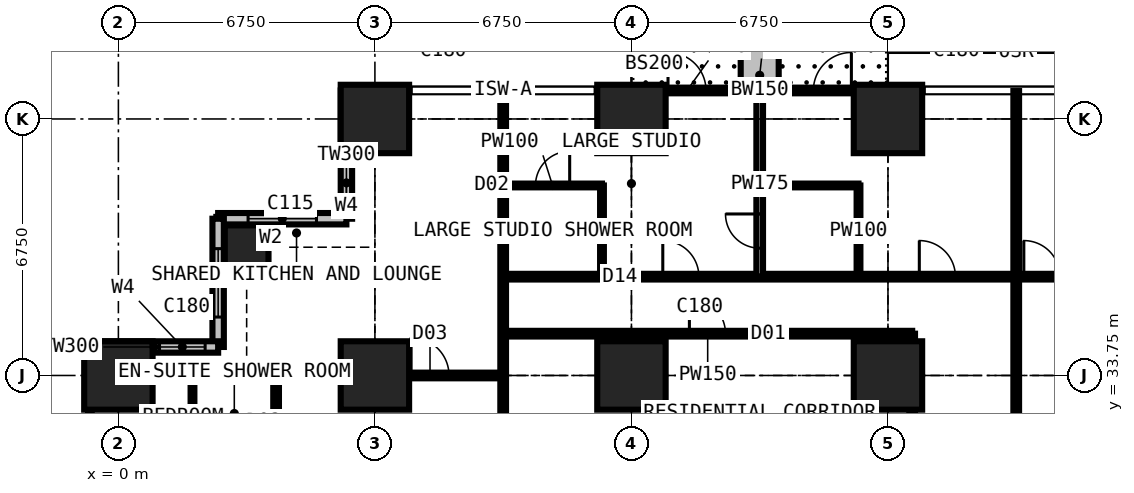
"""IFC4 building model, lengths in metres.
Left out: names, types, materials, properties, quantities, classifications, styles, units other than length and angle.
Written with IfcOpenShell. Run it as: python <this file> out.ifc"""

import sys

from ifc_helpers import new_model, si_unit, direction, frame, frame_2d, origin, origin_2d, place, context, subcontext, project, spatial, rectangle, extrude, element, fill, save


model = new_model("IFC4")
c1 = context("Model", 3, precision=1e-05, world=origin(), true_north=direction((0.0, 1.0)))
c2 = subcontext(c1, "Body", "Model", "MODEL_VIEW")
j1 = project(units=[si_unit("LENGTHUNIT", "METRE"), si_unit("PLANEANGLEUNIT", "RADIAN")], contexts=[c1])
p1 = place(None, origin())
s1 = spatial("IfcSite", under=j1, at=p1, CompositionType="ELEMENT")
p2 = place(p1, origin())
s2 = spatial("IfcBuilding", under=s1, at=p2, CompositionType="ELEMENT")
p3 = place(p2, frame((0.0, 0.0, 68.4)))
s3 = spatial("IfcBuildingStorey", under=s2, at=p3, CompositionType="ELEMENT", Elevation=68.4)
p4 = place(p3, frame((0.0, 33.75, 0.0), z_axis=(0.0, 0.0, 1.0), x_axis=(1.0, 0.0, 0.0)))
e1 = element("IfcColumn", 1, at=p4, inside=s3, PredefinedType="COLUMN", context=c2, shape_type="SweptSolid", body=[
    extrude(rectangle(XDim=1.8, YDim=1.8, at=origin_2d()), origin(), (0.0, 0.0, 1.0), 3.6),
])
p5 = place(p3, frame((3.375, 37.125, 0.0), z_axis=(0.0, 0.0, 1.0), x_axis=(1.0, 0.0, 0.0)))
e2 = element("IfcColumn", 2, at=p5, inside=s3, PredefinedType="COLUMN", context=c2, shape_type="SweptSolid", body=[
    extrude(rectangle(XDim=1.15, YDim=1.15, at=origin_2d()), origin(), (0.0, 0.0, 1.0), 3.6),
])
for number, where, z_axis, x_axis in (
    (3, (6.75, 33.75, 0.0), (0.0, 0.0, 1.0), (1.0, 0.0, 0.0)),
    (4, (6.75, 40.5, 0.0), (0.0, 0.0, 1.0), (1.0, 0.0, 0.0)),
    (5, (13.5, 33.75, 0.0), (0.0, 0.0, 1.0), (1.0, 0.0, 0.0)),
    (6, (13.5, 40.5, 0.0), (0.0, 0.0, 1.0), (1.0, 0.0, 0.0)),
    (7, (20.25, 33.75, 0.0), (0.0, 0.0, 1.0), (1.0, 0.0, 0.0)),
    (8, (20.25, 40.5, 0.0), (0.0, 0.0, 1.0), (1.0, 0.0, 0.0)),
):
    element("IfcColumn", number, at=place(p3, frame(where, z_axis=z_axis, x_axis=x_axis)), inside=s3, PredefinedType="COLUMN", context=c2, shape_type="SweptSolid", body=[
        extrude(rectangle(XDim=1.8, YDim=1.8, at=origin_2d()), origin(), (0.0, 0.0, 1.0), 3.6),
    ])
p6 = place(p3, frame((13.5, 41.25, 0.0), z_axis=(0.0, 0.0, 1.0), x_axis=(1.0, 0.0, 0.0)))
e9 = element("IfcWall", 9, at=p6, inside=s3, PredefinedType="SOLIDWALL", context=c2, shape_type="SweptSolid", body=[
    extrude(rectangle(XDim=6.75, YDim=0.15, at=frame_2d((3.375, 0.0))), origin(), (0.0, 0.0, 1.0), 3.375),
])
p7 = place(p6, frame((0.962, 0.0, 0.0)))
e10 = element("IfcOpeningElement", 10, at=p7, cuts=e9, PredefinedType="OPENING", context=c2, shape_type="SweptSolid", body=[
    extrude(rectangle(XDim=1.0, YDim=2.2, at=frame_2d((0.5, 1.1))), frame((0.0, 0.085, 0.0), z_axis=(0.0, -1.0, 0.0), x_axis=(1.0, 0.0, 0.0)), (0.0, 0.0, 1.0), 0.17),
])
p8 = place(p6, frame((2.025, 0.0, 0.9)))
e11 = element("IfcOpeningElement", 11, at=p8, cuts=e9, PredefinedType="OPENING", context=c2, shape_type="SweptSolid", body=[
    extrude(rectangle(XDim=1.2, YDim=1.8, at=frame_2d((0.6, 0.9))), frame((0.0, 0.085, 0.0), z_axis=(0.0, -1.0, 0.0), x_axis=(1.0, 0.0, 0.0)), (0.0, 0.0, 1.0), 0.17),
])
p9 = place(p6, frame((4.788, 0.0, 0.0)))
e12 = element("IfcOpeningElement", 12, at=p9, cuts=e9, PredefinedType="OPENING", context=c2, shape_type="SweptSolid", body=[
    extrude(rectangle(XDim=1.0, YDim=2.2, at=frame_2d((0.5, 1.1))), frame((0.0, 0.085, 0.0), z_axis=(0.0, -1.0, 0.0), x_axis=(1.0, 0.0, 0.0)), (0.0, 0.0, 1.0), 0.17),
])
p10 = place(p6, frame((3.525, 0.0, 0.9)))
e13 = element("IfcOpeningElement", 13, at=p10, cuts=e9, PredefinedType="OPENING", context=c2, shape_type="SweptSolid", body=[
    extrude(rectangle(XDim=1.2, YDim=1.8, at=frame_2d((0.6, 0.9))), frame((0.0, 0.085, 0.0), z_axis=(0.0, -1.0, 0.0), x_axis=(1.0, 0.0, 0.0)), (0.0, 0.0, 1.0), 0.17),
])
p11 = place(p3, frame((6.0, 41.25, 0.0), z_axis=(0.0, 0.0, 1.0), x_axis=(0.0, -1.0, 0.0)))
e14 = element("IfcWall", 14, at=p11, inside=s3, PredefinedType="SOLIDWALL", context=c2, shape_type="SweptSolid", body=[
    extrude(rectangle(XDim=3.375, YDim=0.3, at=frame_2d((1.688, 0.0))), origin(), (0.0, 0.0, 1.0), 3.375),
])
p12 = place(p11, frame((1.833, 0.0, 0.9)))
e15 = element("IfcOpeningElement", 15, at=p12, cuts=e14, PredefinedType="OPENING", context=c2, shape_type="SweptSolid", body=[
    extrude(rectangle(XDim=1.2, YDim=1.8, at=frame_2d((0.6, 0.9))), frame((0.0, 0.16, 0.0), z_axis=(0.0, -1.0, 0.0), x_axis=(1.0, 0.0, 0.0)), (0.0, 0.0, 1.0), 0.32),
])
p13 = place(p3, frame((6.0, 37.875, 0.0), z_axis=(0.0, 0.0, 1.0), x_axis=(-1.0, 0.0, 0.0)))
e16 = element("IfcWall", 16, at=p13, inside=s3, PredefinedType="SOLIDWALL", context=c2, shape_type="SweptSolid", body=[
    extrude(rectangle(XDim=3.375, YDim=0.3, at=frame_2d((1.688, 0.0))), origin(), (0.0, 0.0, 1.0), 3.375),
])
p14 = place(p13, frame((0.788, 0.0, 0.6)))
e17 = element("IfcOpeningElement", 17, at=p14, cuts=e16, PredefinedType="OPENING", context=c2, shape_type="SweptSolid", body=[
    extrude(rectangle(XDim=1.8, YDim=2.1, at=frame_2d((0.9, 1.05))), frame((0.0, 0.16, 0.0), z_axis=(0.0, -1.0, 0.0), x_axis=(1.0, 0.0, 0.0)), (0.0, 0.0, 1.0), 0.32),
])
p15 = place(p3, frame((2.625, 37.875, 0.0), z_axis=(0.0, 0.0, 1.0), x_axis=(0.0, -1.0, 0.0)))
e18 = element("IfcWall", 18, at=p15, inside=s3, PredefinedType="SOLIDWALL", context=c2, shape_type="SweptSolid", body=[
    extrude(rectangle(XDim=3.375, YDim=0.3, at=frame_2d((1.688, 0.0))), origin(), (0.0, 0.0, 1.0), 3.375),
])
p16 = place(p15, frame((0.788, 0.0, 0.6)))
e19 = element("IfcOpeningElement", 19, at=p16, cuts=e18, PredefinedType="OPENING", context=c2, shape_type="SweptSolid", body=[
    extrude(rectangle(XDim=1.8, YDim=2.1, at=frame_2d((0.9, 1.05))), frame((0.0, 0.16, 0.0), z_axis=(0.0, -1.0, 0.0), x_axis=(1.0, 0.0, 0.0)), (0.0, 0.0, 1.0), 0.32),
])
p17 = place(p3, frame((2.625, 34.5, 0.0), z_axis=(0.0, 0.0, 1.0), x_axis=(-1.0, 0.0, 0.0)))
e20 = element("IfcWall", 20, at=p17, inside=s3, PredefinedType="SOLIDWALL", context=c2, shape_type="SweptSolid", body=[
    extrude(rectangle(XDim=3.375, YDim=0.3, at=frame_2d((1.688, 0.0))), origin(), (0.0, 0.0, 1.0), 3.375),
])
p18 = place(p17, frame((0.343, 0.0, 0.9)))
e21 = element("IfcOpeningElement", 21, at=p18, cuts=e20, PredefinedType="OPENING", context=c2, shape_type="SweptSolid", body=[
    extrude(rectangle(XDim=1.2, YDim=1.8, at=frame_2d((0.6, 0.9))), frame((0.0, 0.16, 0.0), z_axis=(0.0, -1.0, 0.0), x_axis=(1.0, 0.0, 0.0)), (0.0, 0.0, 1.0), 0.32),
])
p19 = place(p3, frame((16.875, 41.35, 0.0), z_axis=(0.0, 0.0, 1.0), x_axis=(0.0, 1.0, 0.0)))
e22 = element("IfcWall", 22, at=p19, inside=s3, PredefinedType="USERDEFINED", context=c2, shape_type="SweptSolid", body=[
    extrude(rectangle(XDim=2.2, YDim=1.0, at=frame_2d((1.1, 0.0))), origin(), (0.0, 0.0, 1.0), 0.9),
])
p20 = place(p3, frame((-0.734, 33.75, 0.0), z_axis=(0.0, 0.0, 1.0), x_axis=(1.0, 0.0, 0.0)))
e23 = element("IfcWall", 23, at=p20, inside=s3, PredefinedType="PARTITIONING", context=c2, shape_type="SweptSolid", body=[
    extrude(rectangle(XDim=10.859, YDim=0.15, at=frame_2d((5.429, 0.0))), origin(), (0.0, 0.0, 1.0), 2.877),
])
p21 = place(p20, frame((8.434, 0.0, 0.0)))
e24 = element("IfcOpeningElement", 24, at=p21, cuts=e23, PredefinedType="OPENING", context=c2, shape_type="SweptSolid", body=[
    extrude(rectangle(XDim=1.0, YDim=2.2, at=frame_2d((0.5, 1.1))), frame((0.0, 0.085, 0.0), z_axis=(0.0, -1.0, 0.0), x_axis=(1.0, 0.0, 0.0)), (0.0, 0.0, 1.0), 0.17),
])
p22 = place(p3, frame((1.95, 31.75, 0.0), z_axis=(0.0, 0.0, 1.0), x_axis=(0.0, 1.0, 0.0)))
e25 = element("IfcWall", 25, at=p22, inside=s3, PredefinedType="PARTITIONING", context=c2, shape_type="SweptSolid", body=[
    extrude(rectangle(XDim=2.0, YDim=0.1, at=frame_2d((1.0, 0.0))), origin(), (0.0, 0.0, 1.0), 3.375),
])
p23 = place(p3, frame((4.15, 10.125, 0.0), z_axis=(0.0, 0.0, 1.0), x_axis=(0.0, 1.0, 0.0)))
e26 = element("IfcWall", 26, at=p23, inside=s3, PredefinedType="PARTITIONING", context=c2, shape_type="SweptSolid", body=[
    extrude(rectangle(XDim=23.625, YDim=0.15, at=frame_2d((11.812, 0.0))), origin(), (0.0, 0.0, 1.0), 3.375),
])
p24 = place(p23, frame((20.5, 0.0, 0.0)))
e27 = element("IfcOpeningElement", 27, at=p24, cuts=e26, PredefinedType="OPENING", context=c2, shape_type="SweptSolid", body=[
    extrude(rectangle(XDim=0.95, YDim=2.2, at=frame_2d((0.475, 1.1))), frame((0.0, 0.085, 0.0), z_axis=(0.0, -1.0, 0.0), x_axis=(1.0, 0.0, 0.0)), (0.0, 0.0, 1.0), 0.17),
])
p25 = place(p23, frame((17.125, 0.0, 0.0)))
e28 = element("IfcOpeningElement", 28, at=p25, cuts=e26, PredefinedType="OPENING", context=c2, shape_type="SweptSolid", body=[
    extrude(rectangle(XDim=0.95, YDim=2.2, at=frame_2d((0.475, 1.1))), frame((0.0, 0.085, 0.0), z_axis=(0.0, -1.0, 0.0), x_axis=(1.0, 0.0, 0.0)), (0.0, 0.0, 1.0), 0.17),
])
p26 = place(p23, frame((13.7, 0.0, 0.0)))
e29 = element("IfcOpeningElement", 29, at=p26, cuts=e26, PredefinedType="OPENING", context=c2, shape_type="SweptSolid", body=[
    extrude(rectangle(XDim=0.95, YDim=2.2, at=frame_2d((0.475, 1.1))), frame((0.0, 0.085, 0.0), z_axis=(0.0, -1.0, 0.0), x_axis=(1.0, 0.0, 0.0)), (0.0, 0.0, 1.0), 0.17),
])
p27 = place(p23, frame((4.2, 0.0, 0.0)))
e30 = element("IfcOpeningElement", 30, at=p27, cuts=e26, PredefinedType="OPENING", context=c2, shape_type="SweptSolid", body=[
    extrude(rectangle(XDim=0.95, YDim=2.2, at=frame_2d((0.475, 1.1))), frame((0.0, 0.085, 0.0), z_axis=(0.0, -1.0, 0.0), x_axis=(1.0, 0.0, 0.0)), (0.0, 0.0, 1.0), 0.17),
])
p28 = place(p23, frame((10.95, 0.0, 0.0)))
e31 = element("IfcOpeningElement", 31, at=p28, cuts=e26, PredefinedType="OPENING", context=c2, shape_type="SweptSolid", body=[
    extrude(rectangle(XDim=0.95, YDim=2.2, at=frame_2d((0.475, 1.1))), frame((0.0, 0.085, 0.0), z_axis=(0.0, -1.0, 0.0), x_axis=(1.0, 0.0, 0.0)), (0.0, 0.0, 1.0), 0.17),
])
p29 = place(p3, frame((10.125, 30.375, 0.0), z_axis=(0.0, 0.0, 1.0), x_axis=(0.0, 1.0, 0.0)))
e32 = element("IfcWall", 32, at=p29, inside=s3, PredefinedType="PARTITIONING", context=c2, shape_type="SweptSolid", body=[
    extrude(rectangle(XDim=10.859, YDim=0.15, at=frame_2d((5.429, 0.0))), origin(), (0.0, 0.0, 1.0), 3.375),
])
p30 = place(p3, frame((10.125, 34.85, 0.0), z_axis=(0.0, 0.0, 1.0), x_axis=(1.0, 0.0, 0.0)))
e33 = element("IfcWall", 33, at=p30, inside=s3, PredefinedType="PARTITIONING", context=c2, shape_type="SweptSolid", body=[
    extrude(rectangle(XDim=10.762, YDim=0.15, at=frame_2d((5.381, 0.0))), origin(), (0.0, 0.0, 1.0), 3.375),
])
p31 = place(p30, frame((4.9, 0.0, 0.0)))
e34 = element("IfcOpeningElement", 34, at=p31, cuts=e33, PredefinedType="OPENING", context=c2, shape_type="SweptSolid", body=[
    extrude(rectangle(XDim=0.95, YDim=2.2, at=frame_2d((0.475, 1.1))), frame((0.0, 0.085, 0.0), z_axis=(0.0, -1.0, 0.0), x_axis=(1.0, 0.0, 0.0)), (0.0, 0.0, 1.0), 0.17),
])
p32 = place(p3, frame((10.125, 36.35, 0.0), z_axis=(0.0, 0.0, 1.0), x_axis=(1.0, 0.0, 0.0)))
e35 = element("IfcWall", 35, at=p32, inside=s3, PredefinedType="PARTITIONING", context=c2, shape_type="SweptSolid", body=[
    extrude(rectangle(XDim=23.625, YDim=0.15, at=frame_2d((11.812, 0.0))), origin(), (0.0, 0.0, 1.0), 3.375),
])
p33 = place(p32, frame((21.45, 0.0, 0.0)))
e36 = element("IfcOpeningElement", 36, at=p33, cuts=e35, PredefinedType="OPENING", context=c2, shape_type="SweptSolid", body=[
    extrude(rectangle(XDim=1.0, YDim=2.2, at=frame_2d((0.5, 1.1))), frame((0.0, 0.085, 0.0), z_axis=(0.0, -1.0, 0.0), x_axis=(1.0, 0.0, 0.0)), (0.0, 0.0, 1.0), 0.17),
])
p34 = place(p32, frame((17.125, 0.0, 0.0)))
e37 = element("IfcOpeningElement", 37, at=p34, cuts=e35, PredefinedType="OPENING", context=c2, shape_type="SweptSolid", body=[
    extrude(rectangle(XDim=0.95, YDim=2.2, at=frame_2d((0.475, 1.1))), frame((0.0, 0.085, 0.0), z_axis=(0.0, -1.0, 0.0), x_axis=(1.0, 0.0, 0.0)), (0.0, 0.0, 1.0), 0.17),
])
p35 = place(p32, frame((13.7, 0.0, 0.0)))
e38 = element("IfcOpeningElement", 38, at=p35, cuts=e35, PredefinedType="OPENING", context=c2, shape_type="SweptSolid", body=[
    extrude(rectangle(XDim=0.95, YDim=2.2, at=frame_2d((0.475, 1.1))), frame((0.0, 0.085, 0.0), z_axis=(0.0, -1.0, 0.0), x_axis=(1.0, 0.0, 0.0)), (0.0, 0.0, 1.0), 0.17),
])
p36 = place(p32, frame((4.2, 0.0, 0.0)))
e39 = element("IfcOpeningElement", 39, at=p36, cuts=e35, PredefinedType="OPENING", context=c2, shape_type="SweptSolid", body=[
    extrude(rectangle(XDim=0.95, YDim=2.2, at=frame_2d((0.475, 1.1))), frame((0.0, 0.085, 0.0), z_axis=(0.0, -1.0, 0.0), x_axis=(1.0, 0.0, 0.0)), (0.0, 0.0, 1.0), 0.17),
])
p37 = place(p32, frame((10.95, 0.0, 0.0)))
e40 = element("IfcOpeningElement", 40, at=p37, cuts=e35, PredefinedType="OPENING", context=c2, shape_type="SweptSolid", body=[
    extrude(rectangle(XDim=0.95, YDim=2.2, at=frame_2d((0.475, 1.1))), frame((0.0, 0.085, 0.0), z_axis=(0.0, -1.0, 0.0), x_axis=(1.0, 0.0, 0.0)), (0.0, 0.0, 1.0), 0.17),
])
p38 = place(p3, frame((10.125, 38.75, 0.0), z_axis=(0.0, 0.0, 1.0), x_axis=(1.0, 0.0, 0.0)))
e41 = element("IfcWall", 41, at=p38, inside=s3, PredefinedType="PARTITIONING", context=c2, shape_type="SweptSolid", body=[
    extrude(rectangle(XDim=2.6, YDim=0.1, at=frame_2d((1.3, 0.0))), origin(), (0.0, 0.0, 1.0), 3.375),
])
p39 = place(p38, frame((0.85, 0.0, 0.0)))
e42 = element("IfcOpeningElement", 42, at=p39, cuts=e41, PredefinedType="OPENING", context=c2, shape_type="SweptSolid", body=[
    extrude(rectangle(XDim=0.9, YDim=2.2, at=frame_2d((0.45, 1.1))), frame((0.0, 0.06, 0.0), z_axis=(0.0, -1.0, 0.0), x_axis=(1.0, 0.0, 0.0)), (0.0, 0.0, 1.0), 0.12),
])
p40 = place(p3, frame((12.725, 36.35, 0.0), z_axis=(0.0, 0.0, 1.0), x_axis=(0.0, 1.0, 0.0)))
e43 = element("IfcWall", 43, at=p40, inside=s3, PredefinedType="PARTITIONING", context=c2, shape_type="SweptSolid", body=[
    extrude(rectangle(XDim=2.4, YDim=0.1, at=frame_2d((1.2, 0.0))), origin(), (0.0, 0.0, 1.0), 3.375),
])
p41 = place(p3, frame((16.875, 36.35, 0.0), z_axis=(0.0, 0.0, 1.0), x_axis=(0.0, 1.0, 0.0)))
e44 = element("IfcWall", 44, at=p41, inside=s3, PredefinedType="PARTITIONING", context=c2, shape_type="SweptSolid", body=[
    extrude(rectangle(XDim=4.884, YDim=0.175, at=frame_2d((2.442, 0.0))), origin(), (0.0, 0.0, 1.0), 3.375),
])
p42 = place(p41, frame((0.75, 0.0, 0.0)))
e45 = element("IfcOpeningElement", 45, at=p42, cuts=e44, PredefinedType="OPENING", context=c2, shape_type="SweptSolid", body=[
    extrude(rectangle(XDim=0.9, YDim=2.2, at=frame_2d((0.45, 1.1))), frame((0.0, 0.097, 0.0), z_axis=(0.0, -1.0, 0.0), x_axis=(1.0, 0.0, 0.0)), (0.0, 0.0, 1.0), 0.195),
])
p43 = place(p3, frame((16.875, 38.75, 0.0), z_axis=(0.0, 0.0, 1.0), x_axis=(1.0, 0.0, 0.0)))
e46 = element("IfcWall", 46, at=p43, inside=s3, PredefinedType="PARTITIONING", context=c2, shape_type="SweptSolid", body=[
    extrude(rectangle(XDim=2.6, YDim=0.1, at=frame_2d((1.3, 0.0))), origin(), (0.0, 0.0, 1.0), 3.375),
])
p44 = place(p3, frame((19.475, 36.35, 0.0), z_axis=(0.0, 0.0, 1.0), x_axis=(0.0, 1.0, 0.0)))
e47 = element("IfcWall", 47, at=p44, inside=s3, PredefinedType="PARTITIONING", context=c2, shape_type="SweptSolid", body=[
    extrude(rectangle(XDim=2.4, YDim=0.1, at=frame_2d((1.2, 0.0))), origin(), (0.0, 0.0, 1.0), 3.375),
])
p45 = place(p3, frame((20.887, 29.2, 0.0), z_axis=(0.0, 0.0, 1.0), x_axis=(0.0, 1.0, 0.0)))
e48 = element("IfcWall", 48, at=p45, inside=s3, PredefinedType="PARTITIONING", context=c2, shape_type="SweptSolid", body=[
    extrude(rectangle(XDim=5.65, YDim=0.15, at=frame_2d((2.825, 0.0))), origin(), (0.0, 0.0, 1.0), 3.375),
])
p46 = place(p3, frame((23.625, 29.2, 0.0), z_axis=(0.0, 0.0, 1.0), x_axis=(0.0, 1.0, 0.0)))
e49 = element("IfcWall", 49, at=p46, inside=s3, PredefinedType="PARTITIONING", context=c2, shape_type="SweptSolid", body=[
    extrude(rectangle(XDim=12.034, YDim=0.15, at=frame_2d((6.017, 0.0))), origin(), (0.0, 0.0, 1.0), 3.375),
])
p47 = place(p7, origin())
e50 = element("IfcDoor", 50, at=p47, inside=s3, OperationType="SINGLE_SWING_LEFT", PredefinedType="DOOR", context=c2, shape_type="SweptSolid", body=[
    extrude(rectangle(XDim=1.0, YDim=2.2, at=frame_2d((0.5, 1.1))), frame((0.0, 0.025, 0.0), z_axis=(0.0, -1.0, 0.0), x_axis=(1.0, 0.0, 0.0)), (0.0, 0.0, 1.0), 0.05),
])
fill(e10, e50)
p48 = place(p8, origin())
e51 = element("IfcWindow", 51, at=p48, inside=s3, PartitioningType="SINGLE_PANEL", PredefinedType="WINDOW", context=c2, shape_type="SweptSolid", body=[
    extrude(rectangle(XDim=1.2, YDim=1.8, at=frame_2d((0.6, 0.9))), frame((0.0, 0.03, 0.0), z_axis=(0.0, -1.0, 0.0), x_axis=(1.0, 0.0, 0.0)), (0.0, 0.0, 1.0), 0.06),
])
fill(e11, e51)
p49 = place(p9, origin())
e52 = element("IfcDoor", 52, at=p49, inside=s3, OperationType="SINGLE_SWING_RIGHT", PredefinedType="DOOR", context=c2, shape_type="SweptSolid", body=[
    extrude(rectangle(XDim=1.0, YDim=2.2, at=frame_2d((0.5, 1.1))), frame((0.0, 0.025, 0.0), z_axis=(0.0, -1.0, 0.0), x_axis=(1.0, 0.0, 0.0)), (0.0, 0.0, 1.0), 0.05),
])
fill(e12, e52)
p50 = place(p10, origin())
e53 = element("IfcWindow", 53, at=p50, inside=s3, PartitioningType="SINGLE_PANEL", PredefinedType="WINDOW", context=c2, shape_type="SweptSolid", body=[
    extrude(rectangle(XDim=1.2, YDim=1.8, at=frame_2d((0.6, 0.9))), frame((0.0, 0.03, 0.0), z_axis=(0.0, -1.0, 0.0), x_axis=(1.0, 0.0, 0.0)), (0.0, 0.0, 1.0), 0.06),
])
fill(e13, e53)
p51 = place(p12, origin())
e54 = element("IfcWindow", 54, at=p51, inside=s3, PartitioningType="SINGLE_PANEL", PredefinedType="WINDOW", context=c2, shape_type="SweptSolid", body=[
    extrude(rectangle(XDim=1.2, YDim=1.8, at=frame_2d((0.6, 0.9))), frame((0.0, 0.03, 0.0), z_axis=(0.0, -1.0, 0.0), x_axis=(1.0, 0.0, 0.0)), (0.0, 0.0, 1.0), 0.06),
])
fill(e15, e54)
p52 = place(p14, origin())
e55 = element("IfcWindow", 55, at=p52, inside=s3, PartitioningType="SINGLE_PANEL", PredefinedType="WINDOW", context=c2, shape_type="SweptSolid", body=[
    extrude(rectangle(XDim=1.8, YDim=2.1, at=frame_2d((0.9, 1.05))), frame((0.0, 0.03, 0.0), z_axis=(0.0, -1.0, 0.0), x_axis=(1.0, 0.0, 0.0)), (0.0, 0.0, 1.0), 0.06),
])
fill(e17, e55)
p53 = place(p16, origin())
e56 = element("IfcWindow", 56, at=p53, inside=s3, PartitioningType="SINGLE_PANEL", PredefinedType="WINDOW", context=c2, shape_type="SweptSolid", body=[
    extrude(rectangle(XDim=1.8, YDim=2.1, at=frame_2d((0.9, 1.05))), frame((0.0, 0.03, 0.0), z_axis=(0.0, -1.0, 0.0), x_axis=(1.0, 0.0, 0.0)), (0.0, 0.0, 1.0), 0.06),
])
fill(e19, e56)
p54 = place(p18, origin())
e57 = element("IfcWindow", 57, at=p54, inside=s3, PartitioningType="SINGLE_PANEL", PredefinedType="WINDOW", context=c2, shape_type="SweptSolid", body=[
    extrude(rectangle(XDim=1.2, YDim=1.8, at=frame_2d((0.6, 0.9))), frame((0.0, 0.03, 0.0), z_axis=(0.0, -1.0, 0.0), x_axis=(1.0, 0.0, 0.0)), (0.0, 0.0, 1.0), 0.06),
])
fill(e21, e57)
p55 = place(p35, origin())
e58 = element("IfcDoor", 58, at=p55, inside=s3, OperationType="SINGLE_SWING_LEFT", PredefinedType="DOOR", context=c2, shape_type="SweptSolid", body=[
    extrude(rectangle(XDim=0.95, YDim=2.2, at=frame_2d((0.475, 1.1))), frame((0.0, 0.025, 0.0), z_axis=(0.0, -1.0, 0.0), x_axis=(1.0, 0.0, 0.0)), (0.0, 0.0, 1.0), 0.05),
])
fill(e38, e58)
p56 = place(p36, origin())
e59 = element("IfcDoor", 59, at=p56, inside=s3, OperationType="SINGLE_SWING_LEFT", PredefinedType="DOOR", context=c2, shape_type="SweptSolid", body=[
    extrude(rectangle(XDim=0.95, YDim=2.2, at=frame_2d((0.475, 1.1))), frame((0.0, 0.025, 0.0), z_axis=(0.0, -1.0, 0.0), x_axis=(1.0, 0.0, 0.0)), (0.0, 0.0, 1.0), 0.05),
])
fill(e39, e59)
p57 = place(p39, origin())
e60 = element("IfcDoor", 60, at=p57, inside=s3, OperationType="SINGLE_SWING_RIGHT", PredefinedType="DOOR", context=c2, shape_type="SweptSolid", body=[
    extrude(rectangle(XDim=0.9, YDim=2.2, at=frame_2d((0.45, 1.1))), frame((0.0, 0.025, 0.0), z_axis=(0.0, -1.0, 0.0), x_axis=(1.0, 0.0, 0.0)), (0.0, 0.0, 1.0), 0.05),
])
fill(e42, e60)
p58 = place(p37, origin())
e61 = element("IfcDoor", 61, at=p58, inside=s3, OperationType="SINGLE_SWING_LEFT", PredefinedType="DOOR", context=c2, shape_type="SweptSolid", body=[
    extrude(rectangle(XDim=0.95, YDim=2.2, at=frame_2d((0.475, 1.1))), frame((0.0, 0.025, 0.0), z_axis=(0.0, -1.0, 0.0), x_axis=(1.0, 0.0, 0.0)), (0.0, 0.0, 1.0), 0.05),
])
fill(e40, e61)
p59 = place(p42, origin())
e62 = element("IfcDoor", 62, at=p59, inside=s3, OperationType="SINGLE_SWING_RIGHT", PredefinedType="DOOR", context=c2, shape_type="SweptSolid", body=[
    extrude(rectangle(XDim=0.9, YDim=2.2, at=frame_2d((0.45, 1.1))), frame((0.0, 0.025, 0.0), z_axis=(0.0, -1.0, 0.0), x_axis=(1.0, 0.0, 0.0)), (0.0, 0.0, 1.0), 0.05),
])
fill(e45, e62)
p60 = place(p31, origin())
e63 = element("IfcDoor", 63, at=p60, inside=s3, OperationType="SINGLE_SWING_LEFT", PredefinedType="DOOR", context=c2, shape_type="SweptSolid", body=[
    extrude(rectangle(XDim=0.95, YDim=2.2, at=frame_2d((0.475, 1.1))), frame((0.0, 0.025, 0.0), z_axis=(0.0, -1.0, 0.0), x_axis=(1.0, 0.0, 0.0)), (0.0, 0.0, 1.0), 0.05),
])
fill(e34, e63)
p61 = place(p21, origin())
e64 = element("IfcDoor", 64, at=p61, inside=s3, OperationType="SINGLE_SWING_LEFT", PredefinedType="DOOR", context=c2, shape_type="SweptSolid", body=[
    extrude(rectangle(XDim=1.0, YDim=2.2, at=frame_2d((0.5, 1.1))), frame((0.0, 0.025, 0.0), z_axis=(0.0, -1.0, 0.0), x_axis=(1.0, 0.0, 0.0)), (0.0, 0.0, 1.0), 0.05),
])
fill(e24, e64)
save(model, sys.argv[1])
